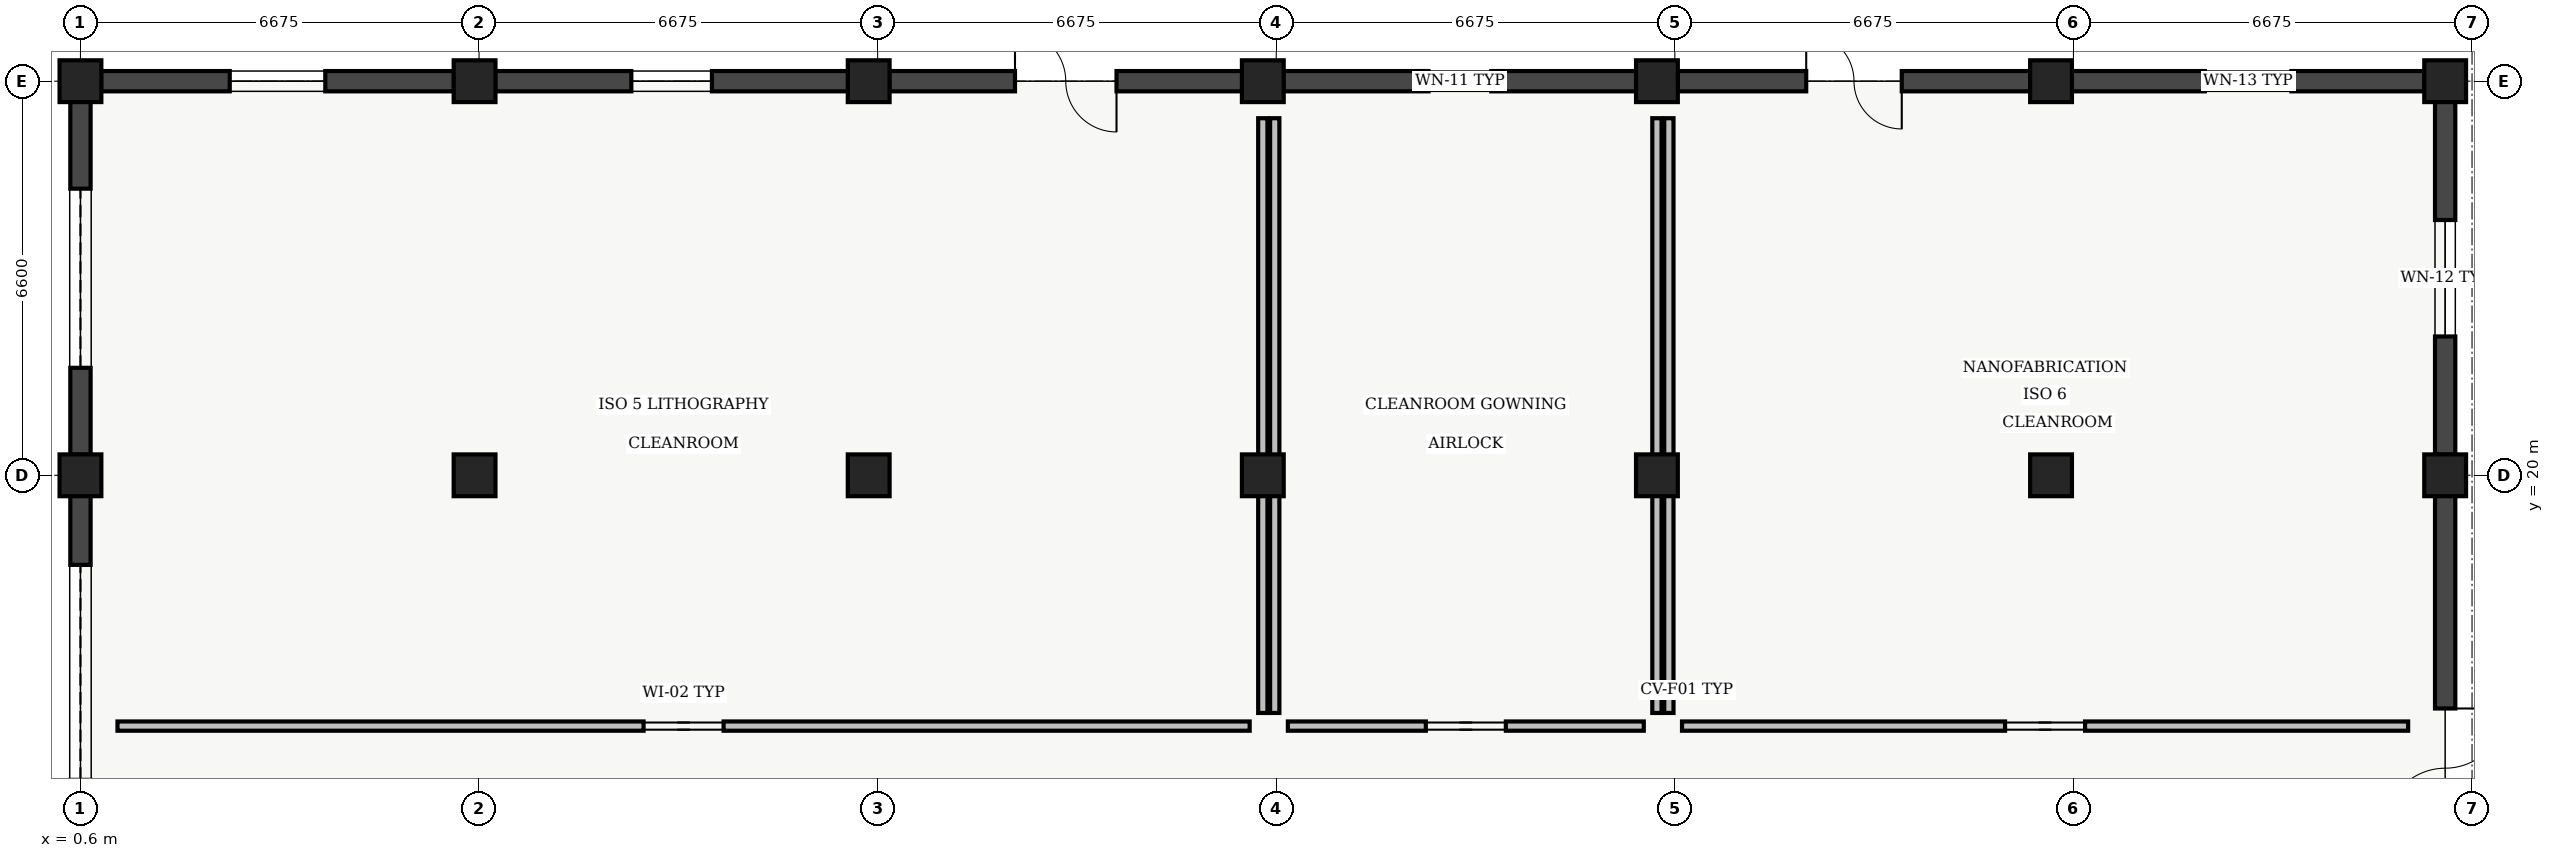
"""IFC4 building model, lengths in metres.
Left out: names, types, materials, properties, quantities, classifications, styles, units other than length and angle.
Written with IfcOpenShell. Run it as: python <this file> out.ifc"""

import sys

from ifc_helpers import new_model, si_unit, direction, frame, frame_2d, origin, origin_2d, place, context, subcontext, project, spatial, rectangle, extrude, element, fill, save


model = new_model("IFC4")
c1 = context("Model", 3, precision=1e-05, world=origin(), true_north=direction((0.0, 1.0)))
c2 = subcontext(c1, "Body", "Model", "MODEL_VIEW")
j1 = project(units=[si_unit("LENGTHUNIT", "METRE"), si_unit("PLANEANGLEUNIT", "RADIAN")], contexts=[c1])
p1 = place(None, origin())
s1 = spatial("IfcSite", under=j1, at=p1, CompositionType="ELEMENT")
p2 = place(p1, origin())
s2 = spatial("IfcBuilding", under=s1, at=p2, CompositionType="ELEMENT")
p3 = place(p2, origin())
s3 = spatial("IfcBuildingStorey", under=s2, at=p3, CompositionType="ELEMENT", Elevation=0.0)
for number, where, z_axis, x_axis in (
    (1, (0.6, 20.0, 0.0), (0.0, 0.0, 1.0), (1.0, 0.0, 0.0)),
    (2, (0.6, 26.6, 0.0), (0.0, 0.0, 1.0), (1.0, 0.0, 0.0)),
    (3, (7.2, 20.0, 0.0), (0.0, 0.0, 1.0), (1.0, 0.0, 0.0)),
    (4, (7.2, 26.6, 0.0), (0.0, 0.0, 1.0), (1.0, 0.0, 0.0)),
    (5, (13.8, 20.0, 0.0), (0.0, 0.0, 1.0), (1.0, 0.0, 0.0)),
    (6, (13.8, 26.6, 0.0), (0.0, 0.0, 1.0), (1.0, 0.0, 0.0)),
    (7, (20.4, 20.0, 0.0), (0.0, 0.0, 1.0), (1.0, 0.0, 0.0)),
    (8, (20.4, 26.6, 0.0), (0.0, 0.0, 1.0), (1.0, 0.0, 0.0)),
    (9, (27.0, 20.0, 0.0), (0.0, 0.0, 1.0), (1.0, 0.0, 0.0)),
    (10, (27.0, 26.6, 0.0), (0.0, 0.0, 1.0), (1.0, 0.0, 0.0)),
    (11, (33.6, 20.0, 0.0), (0.0, 0.0, 1.0), (1.0, 0.0, 0.0)),
    (12, (33.6, 26.6, 0.0), (0.0, 0.0, 1.0), (1.0, 0.0, 0.0)),
    (13, (40.2, 20.0, 0.0), (0.0, 0.0, 1.0), (1.0, 0.0, 0.0)),
    (14, (40.2, 26.6, 0.0), (0.0, 0.0, 1.0), (1.0, 0.0, 0.0)),
):
    element("IfcColumn", number, at=place(p3, frame(where, z_axis=z_axis, x_axis=x_axis)), inside=s3, PredefinedType="COLUMN", context=c2, shape_type="SweptSolid", body=[
        extrude(rectangle(XDim=0.7, YDim=0.7, at=origin_2d()), origin(), (0.0, 0.0, 1.0), 4.88),
    ])
p4 = place(p3, frame((0.6, 13.745, 0.0), z_axis=(0.0, 0.0, 1.0), x_axis=(0.0, 1.0, 0.0)))
e15 = element("IfcWall", 15, at=p4, inside=s3, PredefinedType="SOLIDWALL", context=c2, shape_type="SweptSolid", body=[
    extrude(rectangle(XDim=5.91, YDim=0.34, at=frame_2d((2.955, 0.0))), origin(), (0.0, 0.0, 1.0), 4.415),
])
p5 = place(p4, frame((1.155, 0.0, 0.0)))
e16 = element("IfcOpeningElement", 16, at=p5, cuts=e15, PredefinedType="OPENING", context=c2, shape_type="SweptSolid", body=[
    extrude(rectangle(XDim=3.6, YDim=2.65, at=frame_2d((1.8, 1.325))), frame((0.0, 0.17, 0.0), z_axis=(0.0, -1.0, 0.0), x_axis=(1.0, 0.0, 0.0)), (0.0, 0.0, 1.0), 0.34),
])
p6 = place(p3, frame((0.6, 20.345, 0.0), z_axis=(0.0, 0.0, 1.0), x_axis=(0.0, 1.0, 0.0)))
e17 = element("IfcWall", 17, at=p6, inside=s3, PredefinedType="SOLIDWALL", context=c2, shape_type="SweptSolid", body=[
    extrude(rectangle(XDim=5.91, YDim=0.34, at=frame_2d((2.955, 0.0))), origin(), (0.0, 0.0, 1.0), 4.415),
])
p7 = place(p6, frame((1.455, 0.0, 0.0)))
e18 = element("IfcOpeningElement", 18, at=p7, cuts=e17, PredefinedType="OPENING", context=c2, shape_type="SweptSolid", body=[
    extrude(rectangle(XDim=3.0, YDim=2.65, at=frame_2d((1.5, 1.325))), frame((0.0, 0.17, 0.0), z_axis=(0.0, -1.0, 0.0), x_axis=(1.0, 0.0, 0.0)), (0.0, 0.0, 1.0), 0.34),
])
p8 = place(p3, frame((0.945, 26.6, 0.0), z_axis=(0.0, 0.0, 1.0), x_axis=(1.0, 0.0, 0.0)))
e19 = element("IfcWall", 19, at=p8, inside=s3, PredefinedType="SOLIDWALL", context=c2, shape_type="SweptSolid", body=[
    extrude(rectangle(XDim=5.91, YDim=0.34, at=frame_2d((2.955, 0.0))), origin(), (0.0, 0.0, 1.0), 4.415),
])
p9 = place(p8, frame((2.155, 0.0, 0.95)))
e20 = element("IfcOpeningElement", 20, at=p9, cuts=e19, PredefinedType="OPENING", context=c2, shape_type="SweptSolid", body=[
    extrude(rectangle(XDim=1.6, YDim=1.4, at=frame_2d((0.8, 0.7))), frame((0.0, 0.17, 0.0), z_axis=(0.0, -1.0, 0.0), x_axis=(1.0, 0.0, 0.0)), (0.0, 0.0, 1.0), 0.34),
])
p10 = place(p3, frame((7.545, 26.6, 0.0), z_axis=(0.0, 0.0, 1.0), x_axis=(1.0, 0.0, 0.0)))
e21 = element("IfcWall", 21, at=p10, inside=s3, PredefinedType="SOLIDWALL", context=c2, shape_type="SweptSolid", body=[
    extrude(rectangle(XDim=5.91, YDim=0.34, at=frame_2d((2.955, 0.0))), origin(), (0.0, 0.0, 1.0), 4.415),
])
p11 = place(p10, frame((2.28, 0.0, 0.95)))
e22 = element("IfcOpeningElement", 22, at=p11, cuts=e21, PredefinedType="OPENING", context=c2, shape_type="SweptSolid", body=[
    extrude(rectangle(XDim=1.35, YDim=1.8, at=frame_2d((0.675, 0.9))), frame((0.0, 0.17, 0.0), z_axis=(0.0, -1.0, 0.0), x_axis=(1.0, 0.0, 0.0)), (0.0, 0.0, 1.0), 0.34),
])
p12 = place(p3, frame((14.145, 26.6, 0.0), z_axis=(0.0, 0.0, 1.0), x_axis=(1.0, 0.0, 0.0)))
e23 = element("IfcWall", 23, at=p12, inside=s3, PredefinedType="SOLIDWALL", context=c2, shape_type="SweptSolid", body=[
    extrude(rectangle(XDim=5.91, YDim=0.34, at=frame_2d((2.955, 0.0))), origin(), (0.0, 0.0, 1.0), 4.415),
])
p13 = place(p12, frame((2.105, 0.0, 0.0)))
e24 = element("IfcOpeningElement", 24, at=p13, cuts=e23, PredefinedType="OPENING", context=c2, shape_type="SweptSolid", body=[
    extrude(rectangle(XDim=1.7, YDim=2.2, at=frame_2d((0.85, 1.1))), frame((0.0, 0.17, 0.0), z_axis=(0.0, -1.0, 0.0), x_axis=(1.0, 0.0, 0.0)), (0.0, 0.0, 1.0), 0.34),
])
p14 = place(p3, frame((20.745, 26.6, 0.0), z_axis=(0.0, 0.0, 1.0), x_axis=(1.0, 0.0, 0.0)))
e25 = element("IfcWall", 25, at=p14, inside=s3, PredefinedType="SOLIDWALL", context=c2, shape_type="SweptSolid", body=[
    extrude(rectangle(XDim=5.91, YDim=0.34, at=frame_2d((2.955, 0.0))), origin(), (0.0, 0.0, 1.0), 4.415),
])
p15 = place(p14, frame((2.43, 0.0, 0.95)))
e26 = element("IfcOpeningElement", 26, at=p15, cuts=e25, PredefinedType="OPENING", context=c2, shape_type="SweptSolid", body=[
    extrude(rectangle(XDim=1.05, YDim=1.2, at=frame_2d((0.525, 0.6))), frame((0.0, 0.17, 0.0), z_axis=(0.0, -1.0, 0.0), x_axis=(1.0, 0.0, 0.0)), (0.0, 0.0, 1.0), 0.34),
])
p16 = place(p3, frame((27.345, 26.6, 0.0), z_axis=(0.0, 0.0, 1.0), x_axis=(1.0, 0.0, 0.0)))
e27 = element("IfcWall", 27, at=p16, inside=s3, PredefinedType="SOLIDWALL", context=c2, shape_type="SweptSolid", body=[
    extrude(rectangle(XDim=5.91, YDim=0.34, at=frame_2d((2.955, 0.0))), origin(), (0.0, 0.0, 1.0), 4.415),
])
p17 = place(p16, frame((2.155, 0.0, 0.0)))
e28 = element("IfcOpeningElement", 28, at=p17, cuts=e27, PredefinedType="OPENING", context=c2, shape_type="SweptSolid", body=[
    extrude(rectangle(XDim=1.6, YDim=2.2, at=frame_2d((0.8, 1.1))), frame((0.0, 0.17, 0.0), z_axis=(0.0, -1.0, 0.0), x_axis=(1.0, 0.0, 0.0)), (0.0, 0.0, 1.0), 0.34),
])
p18 = place(p3, frame((33.945, 26.6, 0.0), z_axis=(0.0, 0.0, 1.0), x_axis=(1.0, 0.0, 0.0)))
e29 = element("IfcWall", 29, at=p18, inside=s3, PredefinedType="SOLIDWALL", context=c2, shape_type="SweptSolid", body=[
    extrude(rectangle(XDim=5.91, YDim=0.34, at=frame_2d((2.955, 0.0))), origin(), (0.0, 0.0, 1.0), 4.415),
])
p19 = place(p18, frame((2.23, 0.0, 0.95)))
e30 = element("IfcOpeningElement", 30, at=p19, cuts=e29, PredefinedType="OPENING", context=c2, shape_type="SweptSolid", body=[
    extrude(rectangle(XDim=1.45, YDim=1.35, at=frame_2d((0.725, 0.675))), frame((0.0, 0.17, 0.0), z_axis=(0.0, -1.0, 0.0), x_axis=(1.0, 0.0, 0.0)), (0.0, 0.0, 1.0), 0.34),
])
p20 = place(p3, frame((40.2, 26.255, 0.0), z_axis=(0.0, 0.0, 1.0), x_axis=(0.0, -1.0, 0.0)))
e31 = element("IfcWall", 31, at=p20, inside=s3, PredefinedType="SOLIDWALL", context=c2, shape_type="SweptSolid", body=[
    extrude(rectangle(XDim=5.91, YDim=0.34, at=frame_2d((2.955, 0.0))), origin(), (0.0, 0.0, 1.0), 4.415),
])
p21 = place(p20, frame((1.98, 0.0, 0.95)))
e32 = element("IfcOpeningElement", 32, at=p21, cuts=e31, PredefinedType="OPENING", context=c2, shape_type="SweptSolid", body=[
    extrude(rectangle(XDim=1.95, YDim=1.5, at=frame_2d((0.975, 0.75))), frame((0.0, 0.17, 0.0), z_axis=(0.0, -1.0, 0.0), x_axis=(1.0, 0.0, 0.0)), (0.0, 0.0, 1.0), 0.34),
])
p22 = place(p3, frame((40.2, 19.655, 0.0), z_axis=(0.0, 0.0, 1.0), x_axis=(0.0, -1.0, 0.0)))
e33 = element("IfcWall", 33, at=p22, inside=s3, PredefinedType="SOLIDWALL", context=c2, shape_type="SweptSolid", body=[
    extrude(rectangle(XDim=5.91, YDim=0.34, at=frame_2d((2.955, 0.0))), origin(), (0.0, 0.0, 1.0), 4.415),
])
p23 = place(p22, frame((3.56, 0.0, 0.0)))
e34 = element("IfcOpeningElement", 34, at=p23, cuts=e33, PredefinedType="OPENING", context=c2, shape_type="SweptSolid", body=[
    extrude(rectangle(XDim=2.0, YDim=2.25, at=frame_2d((1.0, 1.125))), frame((0.0, 0.17, 0.0), z_axis=(0.0, -1.0, 0.0), x_axis=(1.0, 0.0, 0.0)), (0.0, 0.0, 1.0), 0.34),
])
p24 = place(p3, frame((1.22, 15.8, 0.0), z_axis=(0.0, 0.0, 1.0), x_axis=(1.0, 0.0, 0.0)))
e35 = element("IfcWall", 35, at=p24, inside=s3, PredefinedType="PARTITIONING", context=c2, shape_type="SweptSolid", body=[
    extrude(rectangle(XDim=18.96, YDim=0.155, at=frame_2d((9.48, 0.0))), origin(), (0.0, 0.0, 1.0), 4.465),
])
p25 = place(p24, frame((8.81, 0.0, 0.0)))
e36 = element("IfcOpeningElement", 36, at=p25, cuts=e35, PredefinedType="OPENING", context=c2, shape_type="SweptSolid", body=[
    extrude(rectangle(XDim=1.34, YDim=2.2, at=frame_2d((0.67, 1.1))), frame((0.0, 0.078, 0.0), z_axis=(0.0, -1.0, 0.0), x_axis=(1.0, 0.0, 0.0)), (0.0, 0.0, 1.0), 0.155),
])
p26 = place(p3, frame((20.4, 16.02, 0.0), z_axis=(0.0, 0.0, 1.0), x_axis=(0.0, 1.0, 0.0)))
e37 = element("IfcWall", 37, at=p26, inside=s3, PredefinedType="PARTITIONING", context=c2, shape_type="SweptSolid", body=[
    extrude(rectangle(XDim=9.96, YDim=0.155, at=frame_2d((4.98, 0.0))), origin(), (0.0, 0.0, 1.0), 4.215),
])
p27 = place(p3, frame((20.82, 15.8, 0.0), z_axis=(0.0, 0.0, 1.0), x_axis=(1.0, 0.0, 0.0)))
e38 = element("IfcWall", 38, at=p27, inside=s3, PredefinedType="PARTITIONING", context=c2, shape_type="SweptSolid", body=[
    extrude(rectangle(XDim=5.96, YDim=0.155, at=frame_2d((2.98, 0.0))), origin(), (0.0, 0.0, 1.0), 4.465),
])
p28 = place(p27, frame((2.31, 0.0, 0.0)))
e39 = element("IfcOpeningElement", 39, at=p28, cuts=e38, PredefinedType="OPENING", context=c2, shape_type="SweptSolid", body=[
    extrude(rectangle(XDim=1.34, YDim=2.2, at=frame_2d((0.67, 1.1))), frame((0.0, 0.078, 0.0), z_axis=(0.0, -1.0, 0.0), x_axis=(1.0, 0.0, 0.0)), (0.0, 0.0, 1.0), 0.155),
])
for number, where, z_axis, x_axis in (
    (40, (27.0, 16.02, 0.0), (0.0, 0.0, 1.0), (0.0, 1.0, 0.0)),
    (41, (20.6, 25.98, 0.0), (0.0, 0.0, 1.0), (0.0, -1.0, 0.0)),
):
    element("IfcWall", number, at=place(p3, frame(where, z_axis=z_axis, x_axis=x_axis)), inside=s3, PredefinedType="PARTITIONING", context=c2, shape_type="SweptSolid", body=[
        extrude(rectangle(XDim=9.96, YDim=0.155, at=frame_2d((4.98, 0.0))), origin(), (0.0, 0.0, 1.0), 4.215),
    ])
p29 = place(p3, frame((27.42, 15.8, 0.0), z_axis=(0.0, 0.0, 1.0), x_axis=(1.0, 0.0, 0.0)))
e42 = element("IfcWall", 42, at=p29, inside=s3, PredefinedType="PARTITIONING", context=c2, shape_type="SweptSolid", body=[
    extrude(rectangle(XDim=12.16, YDim=0.155, at=frame_2d((6.08, 0.0))), origin(), (0.0, 0.0, 1.0), 4.465),
])
p30 = place(p29, frame((5.41, 0.0, 0.0)))
e43 = element("IfcOpeningElement", 43, at=p30, cuts=e42, PredefinedType="OPENING", context=c2, shape_type="SweptSolid", body=[
    extrude(rectangle(XDim=1.34, YDim=2.2, at=frame_2d((0.67, 1.1))), frame((0.0, 0.078, 0.0), z_axis=(0.0, -1.0, 0.0), x_axis=(1.0, 0.0, 0.0)), (0.0, 0.0, 1.0), 0.155),
])
p31 = place(p3, frame((27.2, 25.98, 0.0), z_axis=(0.0, 0.0, 1.0), x_axis=(0.0, -1.0, 0.0)))
e44 = element("IfcWall", 44, at=p31, inside=s3, PredefinedType="PARTITIONING", context=c2, shape_type="SweptSolid", body=[
    extrude(rectangle(XDim=9.96, YDim=0.155, at=frame_2d((4.98, 0.0))), origin(), (0.0, 0.0, 1.0), 4.215),
])
p32 = place(p5, origin())
e45 = element("IfcDoor", 45, at=p32, inside=s3, OperationType="ROLLINGUP", PredefinedType="GATE", context=c2, shape_type="SweptSolid", body=[
    extrude(rectangle(XDim=3.6, YDim=2.65, at=frame_2d((1.8, 1.325))), frame((0.0, 0.025, 0.0), z_axis=(0.0, -1.0, 0.0), x_axis=(1.0, 0.0, 0.0)), (0.0, 0.0, 1.0), 0.05),
])
fill(e16, e45)
p33 = place(p7, origin())
e46 = element("IfcDoor", 46, at=p33, inside=s3, OperationType="ROLLINGUP", PredefinedType="GATE", context=c2, shape_type="SweptSolid", body=[
    extrude(rectangle(XDim=3.0, YDim=2.65, at=frame_2d((1.5, 1.325))), frame((0.0, 0.025, 0.0), z_axis=(0.0, -1.0, 0.0), x_axis=(1.0, 0.0, 0.0)), (0.0, 0.0, 1.0), 0.05),
])
fill(e18, e46)
p34 = place(p9, origin())
e47 = element("IfcWindow", 47, at=p34, inside=s3, PartitioningType="SINGLE_PANEL", PredefinedType="WINDOW", context=c2, shape_type="SweptSolid", body=[
    extrude(rectangle(XDim=1.6, YDim=1.4, at=frame_2d((0.8, 0.7))), frame((0.0, 0.03, 0.0), z_axis=(0.0, -1.0, 0.0), x_axis=(1.0, 0.0, 0.0)), (0.0, 0.0, 1.0), 0.06),
])
fill(e20, e47)
p35 = place(p11, origin())
e48 = element("IfcWindow", 48, at=p35, inside=s3, PartitioningType="SINGLE_PANEL", PredefinedType="WINDOW", context=c2, shape_type="SweptSolid", body=[
    extrude(rectangle(XDim=1.35, YDim=1.8, at=frame_2d((0.675, 0.9))), frame((0.0, 0.03, 0.0), z_axis=(0.0, -1.0, 0.0), x_axis=(1.0, 0.0, 0.0)), (0.0, 0.0, 1.0), 0.06),
])
fill(e22, e48)
p36 = place(p13, origin())
e49 = element("IfcDoor", 49, at=p36, inside=s3, OperationType="DOUBLE_DOOR_SINGLE_SWING", PredefinedType="DOOR", context=c2, shape_type="SweptSolid", body=[
    extrude(rectangle(XDim=1.7, YDim=2.2, at=frame_2d((0.85, 1.1))), frame((0.0, 0.025, 0.0), z_axis=(0.0, -1.0, 0.0), x_axis=(1.0, 0.0, 0.0)), (0.0, 0.0, 1.0), 0.05),
])
fill(e24, e49)
p37 = place(p15, origin())
e50 = element("IfcWindow", 50, at=p37, inside=s3, PartitioningType="SINGLE_PANEL", PredefinedType="WINDOW", context=c2, shape_type="SweptSolid", body=[
    extrude(rectangle(XDim=1.05, YDim=1.2, at=frame_2d((0.525, 0.6))), frame((0.0, 0.03, 0.0), z_axis=(0.0, -1.0, 0.0), x_axis=(1.0, 0.0, 0.0)), (0.0, 0.0, 1.0), 0.06),
])
fill(e26, e50)
p38 = place(p17, origin())
e51 = element("IfcDoor", 51, at=p38, inside=s3, OperationType="DOUBLE_DOOR_SINGLE_SWING", PredefinedType="DOOR", context=c2, shape_type="SweptSolid", body=[
    extrude(rectangle(XDim=1.6, YDim=2.2, at=frame_2d((0.8, 1.1))), frame((0.0, 0.025, 0.0), z_axis=(0.0, -1.0, 0.0), x_axis=(1.0, 0.0, 0.0)), (0.0, 0.0, 1.0), 0.05),
])
fill(e28, e51)
p39 = place(p19, origin())
e52 = element("IfcWindow", 52, at=p39, inside=s3, PartitioningType="SINGLE_PANEL", PredefinedType="WINDOW", context=c2, shape_type="SweptSolid", body=[
    extrude(rectangle(XDim=1.45, YDim=1.35, at=frame_2d((0.725, 0.675))), frame((0.0, 0.03, 0.0), z_axis=(0.0, -1.0, 0.0), x_axis=(1.0, 0.0, 0.0)), (0.0, 0.0, 1.0), 0.06),
])
fill(e30, e52)
p40 = place(p21, origin())
e53 = element("IfcWindow", 53, at=p40, inside=s3, PartitioningType="SINGLE_PANEL", PredefinedType="WINDOW", context=c2, shape_type="SweptSolid", body=[
    extrude(rectangle(XDim=1.95, YDim=1.5, at=frame_2d((0.975, 0.75))), frame((0.0, 0.03, 0.0), z_axis=(0.0, -1.0, 0.0), x_axis=(1.0, 0.0, 0.0)), (0.0, 0.0, 1.0), 0.06),
])
fill(e32, e53)
p41 = place(p23, origin())
e54 = element("IfcDoor", 54, at=p41, inside=s3, OperationType="DOUBLE_DOOR_SINGLE_SWING", PredefinedType="DOOR", context=c2, shape_type="SweptSolid", body=[
    extrude(rectangle(XDim=2.0, YDim=2.25, at=frame_2d((1.0, 1.125))), frame((0.0, 0.025, 0.0), z_axis=(0.0, -1.0, 0.0), x_axis=(1.0, 0.0, 0.0)), (0.0, 0.0, 1.0), 0.05),
])
fill(e34, e54)
p42 = place(p25, origin())
e55 = element("IfcDoor", 55, at=p42, inside=s3, OperationType="SLIDING_TO_RIGHT", PredefinedType="DOOR", context=c2, shape_type="SweptSolid", body=[
    extrude(rectangle(XDim=1.34, YDim=2.2, at=frame_2d((0.67, 1.1))), frame((0.0, 0.025, 0.0), z_axis=(0.0, -1.0, 0.0), x_axis=(1.0, 0.0, 0.0)), (0.0, 0.0, 1.0), 0.05),
])
fill(e36, e55)
p43 = place(p28, origin())
e56 = element("IfcDoor", 56, at=p43, inside=s3, OperationType="SLIDING_TO_RIGHT", PredefinedType="DOOR", context=c2, shape_type="SweptSolid", body=[
    extrude(rectangle(XDim=1.34, YDim=2.2, at=frame_2d((0.67, 1.1))), frame((0.0, 0.025, 0.0), z_axis=(0.0, -1.0, 0.0), x_axis=(1.0, 0.0, 0.0)), (0.0, 0.0, 1.0), 0.05),
])
fill(e39, e56)
p44 = place(p30, origin())
e57 = element("IfcDoor", 57, at=p44, inside=s3, OperationType="SLIDING_TO_RIGHT", PredefinedType="DOOR", context=c2, shape_type="SweptSolid", body=[
    extrude(rectangle(XDim=1.34, YDim=2.2, at=frame_2d((0.67, 1.1))), frame((0.0, 0.025, 0.0), z_axis=(0.0, -1.0, 0.0), x_axis=(1.0, 0.0, 0.0)), (0.0, 0.0, 1.0), 0.05),
])
fill(e43, e57)
save(model, sys.argv[1])
